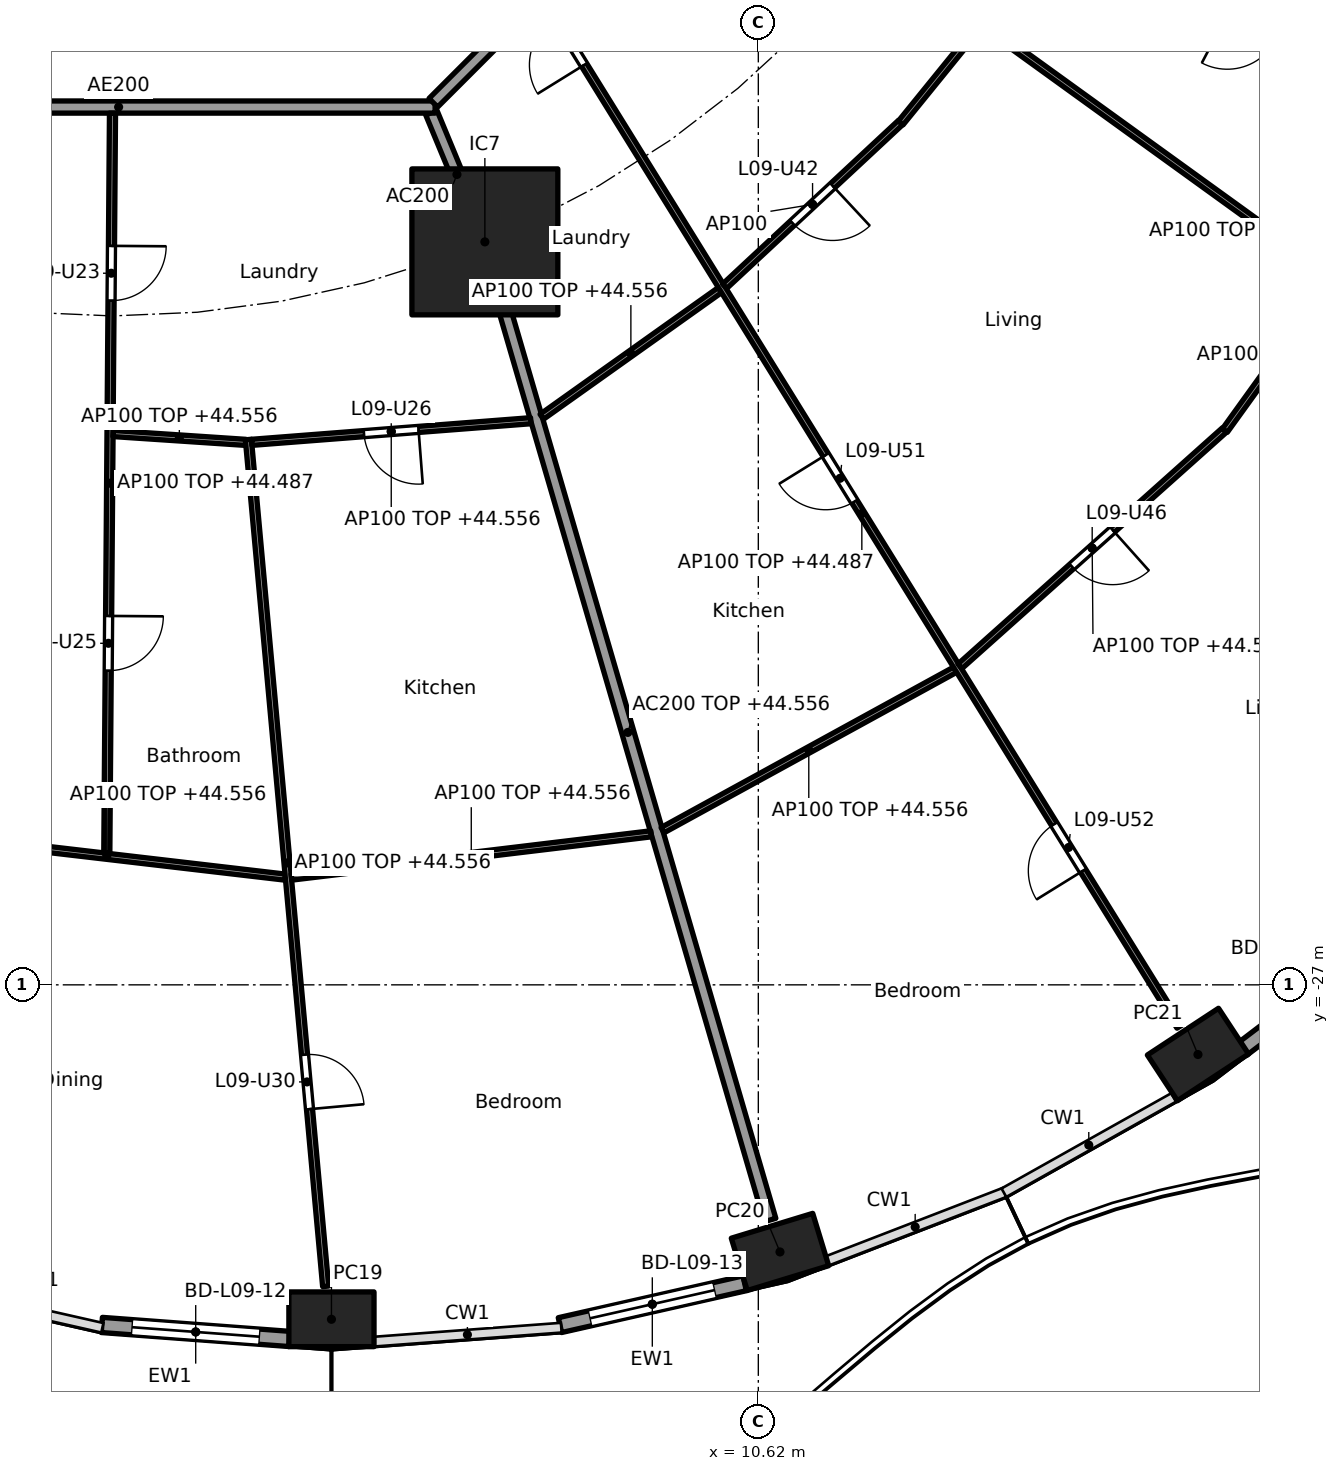
"""IFC4 building model, lengths in metres.
Left out: names, types, materials, properties, quantities, classifications, styles, units other than length and angle.
Written with IfcOpenShell. Run it as: python <this file> out.ifc"""

import sys

from ifc_helpers import new_model, si_unit, direction, frame, frame_2d, origin, origin_2d, place, context, subcontext, project, spatial, rectangle, hollow_rectangle, extrude, element, fill, save


model = new_model("IFC4")
c1 = context("Model", 3, precision=1e-05, world=origin(), true_north=direction((0.0, 1.0)))
c2 = subcontext(c1, "Body", "Model", "MODEL_VIEW")
j1 = project(units=[si_unit("LENGTHUNIT", "METRE"), si_unit("PLANEANGLEUNIT", "RADIAN")], contexts=[c1])
p1 = place(None, origin())
s1 = spatial("IfcSite", under=j1, at=p1, CompositionType="ELEMENT")
p2 = place(p1, origin())
s2 = spatial("IfcBuilding", under=s1, at=p2, CompositionType="ELEMENT")
p3 = place(p2, frame((0.0, 0.0, 41.8)))
s3 = spatial("IfcBuildingStorey", under=s2, at=p3, CompositionType="ELEMENT", Elevation=41.8)
for number, where, z_axis, x_axis in (
    (1, (3.6, -32.5, 0.0), (0.0, 0.0, 1.0), (1.0, 0.0, 0.0)),
    (2, (10.976, -31.393, 0.0), (0.0, 0.0, 1.0), (0.957, 0.292, 0.0)),
    (3, (17.85, -28.146, 0.0), (0.0, 0.0, 1.0), (0.836, 0.549, 0.0)),
):
    element("IfcColumn", number, at=place(p3, frame(where, z_axis=z_axis, x_axis=x_axis)), inside=s3, PredefinedType="COLUMN", context=c2, shape_type="SweptSolid", body=[
        extrude(hollow_rectangle(XDim=1.4, YDim=0.9, WallThickness=0.05, at=origin_2d()), origin(), (0.0, 0.0, 1.0), 3.7),
    ])
p4 = place(p3, frame((6.123, -14.782, 0.0), z_axis=(0.0, 0.0, 1.0), x_axis=(1.0, 0.0, 0.0)))
e4 = element("IfcColumn", 4, at=p4, inside=s3, PredefinedType="COLUMN", context=c2, shape_type="SweptSolid", body=[
    extrude(rectangle(XDim=2.4, YDim=2.4, at=origin_2d()), origin(), (0.0, 0.0, 1.0), 3.7),
])
p5 = place(p3, frame((2.911, -32.823, 0.0), z_axis=(0.0, 0.0, 1.0), x_axis=(-0.997230834878, 0.074368420505, 0.0)))
e5 = element("IfcWall", 5, at=p5, inside=s3, PredefinedType="SOLIDWALL", context=c2, shape_type="SweptSolid", body=[
    extrude(rectangle(XDim=3.096, YDim=0.25, at=frame_2d((1.548, 0.0))), origin(), (0.0, 0.0, 1.0), 3.44),
])
p6 = place(p5, frame((0.498, 0.0, 0.0)))
e6 = element("IfcOpeningElement", 6, at=p6, cuts=e5, PredefinedType="OPENING", context=c2, shape_type="SweptSolid", body=[
    extrude(rectangle(XDim=2.1, YDim=2.4, at=frame_2d((1.05, 1.2))), frame((0.0, 0.135, 0.0), z_axis=(0.0, -1.0, 0.0), x_axis=(1.0, 0.0, 0.0)), (0.0, 0.0, 1.0), 0.27),
])
p7 = place(p3, frame((10.396, -31.908, 0.0), z_axis=(0.0, 0.0, 1.0), x_axis=(-0.97533495413, -0.220729987208, 0.0)))
e7 = element("IfcWall", 7, at=p7, inside=s3, PredefinedType="SOLIDWALL", context=c2, shape_type="SweptSolid", body=[
    extrude(rectangle(XDim=3.115, YDim=0.25, at=frame_2d((1.557, 0.0))), origin(), (0.0, 0.0, 1.0), 3.44),
])
p8 = place(p7, frame((0.507, 0.0, 0.0)))
e8 = element("IfcOpeningElement", 8, at=p8, cuts=e7, PredefinedType="OPENING", context=c2, shape_type="SweptSolid", body=[
    extrude(rectangle(XDim=2.1, YDim=2.4, at=frame_2d((1.05, 1.2))), frame((0.0, 0.135, 0.0), z_axis=(0.0, -1.0, 0.0), x_axis=(1.0, 0.0, 0.0)), (0.0, 0.0, 1.0), 0.27),
])
p9 = place(p3, frame((21.178, -26.081, 0.0), z_axis=(0.0, 0.0, 1.0), x_axis=(-0.796022293214, -0.605267303517, 0.0)))
e9 = element("IfcWall", 9, at=p9, inside=s3, PredefinedType="SOLIDWALL", context=c2, shape_type="SweptSolid", body=[
    extrude(rectangle(XDim=3.262, YDim=0.25, at=frame_2d((1.631, 0.0))), origin(), (0.0, 0.0, 1.0), 3.44),
])
p10 = place(p9, frame((0.581, 0.0, 0.0)))
e10 = element("IfcOpeningElement", 10, at=p10, cuts=e9, PredefinedType="OPENING", context=c2, shape_type="SweptSolid", body=[
    extrude(rectangle(XDim=2.1, YDim=2.4, at=frame_2d((1.05, 1.2))), frame((0.0, 0.135, 0.0), z_axis=(0.0, -1.0, 0.0), x_axis=(1.0, 0.0, 0.0)), (0.0, 0.0, 1.0), 0.27),
])
p11 = place(p3, frame((5.243, -12.657, 0.0), z_axis=(0.0, 0.0, 1.0), x_axis=(0.382707856524, -0.923869415315, 0.0)))
e11 = element("IfcWall", 11, at=p11, inside=s3, PredefinedType="PARTITIONING", context=c2, shape_type="SweptSolid", body=[
    extrude(rectangle(XDim=2.2, YDim=0.2, at=frame_2d((1.1, 0.0))), origin(), (0.0, 0.0, 1.0), 3.44),
])
p12 = place(p3, frame((6.137, -14.83, 0.0), z_axis=(0.0, 0.0, 1.0), x_axis=(0.27985745069, -0.960041565399, 0.0)))
e12 = element("IfcWall", 12, at=p12, inside=s3, PredefinedType="PARTITIONING", context=c2, shape_type="SweptSolid", body=[
    extrude(rectangle(XDim=16.705, YDim=0.2, at=frame_2d((8.353, 0.0))), origin(), (0.0, 0.0, 1.0), 2.756),
])
p13 = place(p3, frame((-5.104, -12.565, 0.0), z_axis=(0.0, 0.0, 1.0), x_axis=(1.0, 0.0, 0.0)))
e13 = element("IfcWall", 13, at=p13, inside=s3, PredefinedType="PARTITIONING", context=c2, shape_type="SweptSolid", body=[
    extrude(rectangle(XDim=10.409, YDim=0.2, at=frame_2d((5.205, 0.0))), origin(), (0.0, 0.0, 1.0), 3.44),
])
p14 = place(p13, frame((2.87, 0.0, 0.0)))
e14 = element("IfcOpeningElement", 14, at=p14, cuts=e13, PredefinedType="OPENING", context=c2, shape_type="SweptSolid", body=[
    extrude(rectangle(XDim=1.0, YDim=2.1, at=frame_2d((0.5, 1.05))), frame((0.0, 0.11, 0.0), z_axis=(0.0, -1.0, 0.0), x_axis=(1.0, 0.0, 0.0)), (0.0, 0.0, 1.0), 0.22),
])
p15 = place(p3, frame((5.275, -12.494, 0.0), z_axis=(0.0, 0.0, 1.0), x_axis=(0.707106781187, 0.707106781187, 0.0)))
e15 = element("IfcWall", 15, at=p15, inside=s3, PredefinedType="PARTITIONING", context=c2, shape_type="SweptSolid", body=[
    extrude(rectangle(XDim=10.409, YDim=0.2, at=frame_2d((5.205, 0.0))), origin(), (0.0, 0.0, 1.0), 3.44),
])
p16 = place(p15, frame((8.508, 0.0, 0.0)))
e16 = element("IfcOpeningElement", 16, at=p16, cuts=e15, PredefinedType="OPENING", context=c2, shape_type="SweptSolid", body=[
    extrude(rectangle(XDim=1.0, YDim=2.1, at=frame_2d((0.5, 1.05))), frame((0.0, 0.11, 0.0), z_axis=(0.0, -1.0, 0.0), x_axis=(1.0, 0.0, 0.0)), (0.0, 0.0, 1.0), 0.22),
])
p17 = place(p3, frame((-3.031, -24.543, 0.0), z_axis=(0.0, 0.0, 1.0), x_axis=(0.993255612046, -0.115945198862, 0.0)))
e17 = element("IfcWall", 17, at=p17, inside=s3, PredefinedType="PARTITIONING", context=c2, shape_type="SweptSolid", body=[
    extrude(rectangle(XDim=5.913, YDim=0.1, at=frame_2d((2.956, 0.0))), origin(), (0.0, 0.0, 1.0), 2.756),
])
p18 = place(p3, frame((-0.001, -12.665, 0.0), z_axis=(0.0, 0.0, 1.0), x_axis=(-0.007702417287, -0.999970335944, 0.0)))
e18 = element("IfcWall", 18, at=p18, inside=s3, PredefinedType="PARTITIONING", context=c2, shape_type="SweptSolid", body=[
    extrude(rectangle(XDim=12.171, YDim=0.1, at=frame_2d((6.086, 0.0))), origin(), (0.0, 0.0, 1.0), 2.687),
])
p19 = place(p18, frame((2.183, 0.0, 0.0)))
e19 = element("IfcOpeningElement", 19, at=p19, cuts=e18, PredefinedType="OPENING", context=c2, shape_type="SweptSolid", body=[
    extrude(rectangle(XDim=0.9, YDim=2.1, at=frame_2d((0.45, 1.05))), frame((0.0, 0.06, 0.0), z_axis=(0.0, -1.0, 0.0), x_axis=(1.0, 0.0, 0.0)), (0.0, 0.0, 1.0), 0.12),
])
p20 = place(p18, frame((8.269, 0.0, 0.0)))
e20 = element("IfcOpeningElement", 20, at=p20, cuts=e18, PredefinedType="OPENING", context=c2, shape_type="SweptSolid", body=[
    extrude(rectangle(XDim=0.9, YDim=2.1, at=frame_2d((0.45, 1.05))), frame((0.0, 0.06, 0.0), z_axis=(0.0, -1.0, 0.0), x_axis=(1.0, 0.0, 0.0)), (0.0, 0.0, 1.0), 0.12),
])
p21 = place(p3, frame((0.009, -17.934, 0.0), z_axis=(0.0, 0.0, 1.0), x_axis=(0.997794542617, -0.066378089183, 0.0)))
e21 = element("IfcWall", 21, at=p21, inside=s3, PredefinedType="PARTITIONING", context=c2, shape_type="SweptSolid", body=[
    extrude(rectangle(XDim=2.185, YDim=0.1, at=frame_2d((1.092, 0.0))), origin(), (0.0, 0.0, 1.0), 2.756),
])
p22 = place(p3, frame((2.234, -18.032, 0.0), z_axis=(0.0, 0.0, 1.0), x_axis=(0.090891502968, -0.995860800859, 0.0)))
e22 = element("IfcWall", 22, at=p22, inside=s3, PredefinedType="PARTITIONING", context=c2, shape_type="SweptSolid", body=[
    extrude(rectangle(XDim=13.984, YDim=0.1, at=frame_2d((6.992, 0.0))), origin(), (0.0, 0.0, 1.0), 2.756),
])
p23 = place(p22, frame((10.158, 0.0, 0.0)))
e23 = element("IfcOpeningElement", 23, at=p23, cuts=e22, PredefinedType="OPENING", context=c2, shape_type="SweptSolid", body=[
    extrude(rectangle(XDim=0.9, YDim=2.1, at=frame_2d((0.45, 1.05))), frame((0.0, 0.06, 0.0), z_axis=(0.0, -1.0, 0.0), x_axis=(1.0, 0.0, 0.0)), (0.0, 0.0, 1.0), 0.12),
])
p24 = place(p3, frame((2.288, -18.078, 0.0), z_axis=(0.0, 0.0, 1.0), x_axis=(0.99701850123, 0.077162868047, 0.0)))
e24 = element("IfcWall", 24, at=p24, inside=s3, PredefinedType="PARTITIONING", context=c2, shape_type="SweptSolid", body=[
    extrude(rectangle(XDim=4.604, YDim=0.1, at=frame_2d((2.302, 0.0))), origin(), (0.0, 0.0, 1.0), 2.756),
])
p25 = place(p24, frame((1.852, 0.0, 0.0)))
e25 = element("IfcOpeningElement", 25, at=p25, cuts=e24, PredefinedType="OPENING", context=c2, shape_type="SweptSolid", body=[
    extrude(rectangle(XDim=0.9, YDim=2.1, at=frame_2d((0.45, 1.05))), frame((0.0, 0.06, 0.0), z_axis=(0.0, -1.0, 0.0), x_axis=(1.0, 0.0, 0.0)), (0.0, 0.0, 1.0), 0.12),
])
p26 = place(p3, frame((2.941, -25.229, 0.0), z_axis=(0.0, 0.0, 1.0), x_axis=(0.992834127896, 0.119500604542, 0.0)))
e26 = element("IfcWall", 26, at=p26, inside=s3, PredefinedType="PARTITIONING", context=c2, shape_type="SweptSolid", body=[
    extrude(rectangle(XDim=5.959, YDim=0.1, at=frame_2d((2.98, 0.0))), origin(), (0.0, 0.0, 1.0), 2.756),
])
p27 = place(p3, frame((7.06, -17.657, 0.0), z_axis=(0.0, 0.0, 1.0), x_axis=(0.81492039338, 0.57957290521, 0.0)))
e27 = element("IfcWall", 27, at=p27, inside=s3, PredefinedType="PARTITIONING", context=c2, shape_type="SweptSolid", body=[
    extrude(rectangle(XDim=3.594, YDim=0.1, at=frame_2d((1.797, 0.0))), origin(), (0.0, 0.0, 1.0), 2.756),
])
p28 = place(p3, frame((9.045, -24.456, 0.0), z_axis=(0.0, 0.0, 1.0), x_axis=(0.876809987787, 0.480837025734, 0.0)))
e28 = element("IfcWall", 28, at=p28, inside=s3, PredefinedType="PARTITIONING", context=c2, shape_type="SweptSolid", body=[
    extrude(rectangle(XDim=5.486, YDim=0.1, at=frame_2d((2.743, 0.0))), origin(), (0.0, 0.0, 1.0), 2.756),
])
p29 = place(p3, frame((7.097, -10.81, 0.0), z_axis=(0.0, 0.0, 1.0), x_axis=(0.526453266471, -0.850204068576, 0.0)))
e29 = element("IfcWall", 29, at=p29, inside=s3, PredefinedType="PARTITIONING", context=c2, shape_type="SweptSolid", body=[
    extrude(rectangle(XDim=19.85, YDim=0.1, at=frame_2d((9.925, 0.0))), origin(), (0.0, 0.0, 1.0), 2.687),
])
p30 = place(p29, frame((0.35, 0.0, 0.0)))
e30 = element("IfcOpeningElement", 30, at=p30, cuts=e29, PredefinedType="OPENING", context=c2, shape_type="SweptSolid", body=[
    extrude(rectangle(XDim=0.9, YDim=2.1, at=frame_2d((0.45, 1.05))), frame((0.0, 0.06, 0.0), z_axis=(0.0, -1.0, 0.0), x_axis=(1.0, 0.0, 0.0)), (0.0, 0.0, 1.0), 0.12),
])
p31 = place(p29, frame((8.795, 0.0, 0.0)))
e31 = element("IfcOpeningElement", 31, at=p31, cuts=e29, PredefinedType="OPENING", context=c2, shape_type="SweptSolid", body=[
    extrude(rectangle(XDim=0.9, YDim=2.1, at=frame_2d((0.45, 1.05))), frame((0.0, 0.06, 0.0), z_axis=(0.0, -1.0, 0.0), x_axis=(1.0, 0.0, 0.0)), (0.0, 0.0, 1.0), 0.12),
])
p32 = place(p29, frame((15.935, 0.0, 0.0)))
e32 = element("IfcOpeningElement", 32, at=p32, cuts=e29, PredefinedType="OPENING", context=c2, shape_type="SweptSolid", body=[
    extrude(rectangle(XDim=0.9, YDim=2.1, at=frame_2d((0.45, 1.05))), frame((0.0, 0.06, 0.0), z_axis=(0.0, -1.0, 0.0), x_axis=(1.0, 0.0, 0.0)), (0.0, 0.0, 1.0), 0.12),
])
p33 = place(p3, frame((10.066, -15.511, 0.0), z_axis=(0.0, 0.0, 1.0), x_axis=(0.732022571638, 0.681280378855, 0.0)))
e33 = element("IfcWall", 33, at=p33, inside=s3, PredefinedType="PARTITIONING", context=c2, shape_type="SweptSolid", body=[
    extrude(rectangle(XDim=3.95, YDim=0.1, at=frame_2d((1.975, 0.0))), origin(), (0.0, 0.0, 1.0), 3.44),
])
p34 = place(p33, frame((1.525, 0.0, 0.0)))
e34 = element("IfcOpeningElement", 34, at=p34, cuts=e33, PredefinedType="OPENING", context=c2, shape_type="SweptSolid", body=[
    extrude(rectangle(XDim=0.9, YDim=2.1, at=frame_2d((0.45, 1.05))), frame((0.0, 0.06, 0.0), z_axis=(0.0, -1.0, 0.0), x_axis=(1.0, 0.0, 0.0)), (0.0, 0.0, 1.0), 0.12),
])
p35 = place(p3, frame((13.936, -21.761, 0.0), z_axis=(0.0, 0.0, 1.0), x_axis=(0.745806142791, 0.666163041136, 0.0)))
e35 = element("IfcWall", 35, at=p35, inside=s3, PredefinedType="PARTITIONING", context=c2, shape_type="SweptSolid", body=[
    extrude(rectangle(XDim=5.831, YDim=0.1, at=frame_2d((2.915, 0.0))), origin(), (0.0, 0.0, 1.0), 2.756),
])
p36 = place(p35, frame((2.465, 0.0, 0.0)))
e36 = element("IfcOpeningElement", 36, at=p36, cuts=e35, PredefinedType="OPENING", context=c2, shape_type="SweptSolid", body=[
    extrude(rectangle(XDim=0.9, YDim=2.1, at=frame_2d((0.45, 1.05))), frame((0.0, 0.06, 0.0), z_axis=(0.0, -1.0, 0.0), x_axis=(1.0, 0.0, 0.0)), (0.0, 0.0, 1.0), 0.12),
])
p37 = place(p3, frame((12.963, -12.825, 0.0), z_axis=(0.0, 0.0, 1.0), x_axis=(0.63012473344, 0.776493928056, 0.0)))
e37 = element("IfcWall", 37, at=p37, inside=s3, PredefinedType="PARTITIONING", context=c2, shape_type="SweptSolid", body=[
    extrude(rectangle(XDim=4.106, YDim=0.1, at=frame_2d((2.053, 0.0))), origin(), (0.0, 0.0, 1.0), 2.756),
])
p38 = place(p3, frame((18.293, -17.884, 0.0), z_axis=(0.0, 0.0, 1.0), x_axis=(0.584558392935, 0.811351640936, 0.0)))
e38 = element("IfcWall", 38, at=p38, inside=s3, PredefinedType="PARTITIONING", context=c2, shape_type="SweptSolid", body=[
    extrude(rectangle(XDim=6.084, YDim=0.1, at=frame_2d((3.042, 0.0))), origin(), (0.0, 0.0, 1.0), 2.756),
])
p39 = place(p3, frame((14.329, -11.221, 0.0), z_axis=(0.0, 0.0, 1.0), x_axis=(0.810671130917, -0.58550176558, 0.0)))
e39 = element("IfcWall", 39, at=p39, inside=s3, PredefinedType="PARTITIONING", context=c2, shape_type="SweptSolid", body=[
    extrude(rectangle(XDim=15.106, YDim=0.1, at=frame_2d((7.553, 0.0))), origin(), (0.0, 0.0, 1.0), 2.837),
])
p40 = place(p39, frame((10.659, 0.0, 0.0)))
e40 = element("IfcOpeningElement", 40, at=p40, cuts=e39, PredefinedType="OPENING", context=c2, shape_type="SweptSolid", body=[
    extrude(rectangle(XDim=0.9, YDim=2.1, at=frame_2d((0.45, 1.05))), frame((0.0, 0.06, 0.0), z_axis=(0.0, -1.0, 0.0), x_axis=(1.0, 0.0, 0.0)), (0.0, 0.0, 1.0), 0.12),
])
p41 = place(p3, frame((10.813, -7.091, 0.0), z_axis=(0.0, 0.0, 1.0), x_axis=(0.885182649479, -0.465243674928, 0.0)))
e41 = element("IfcWall", 41, at=p41, inside=s3, PredefinedType="PARTITIONING", context=c2, shape_type="SweptSolid", body=[
    extrude(rectangle(XDim=12.551, YDim=0.1, at=frame_2d((6.275, 0.0))), origin(), (0.0, 0.0, 1.0), 2.687),
])
p42 = place(p41, frame((0.539, 0.0, 0.0)))
e42 = element("IfcOpeningElement", 42, at=p42, cuts=e41, PredefinedType="OPENING", context=c2, shape_type="SweptSolid", body=[
    extrude(rectangle(XDim=0.9, YDim=2.1, at=frame_2d((0.45, 1.05))), frame((0.0, 0.06, 0.0), z_axis=(0.0, -1.0, 0.0), x_axis=(1.0, 0.0, 0.0)), (0.0, 0.0, 1.0), 0.12),
])
p43 = place(p41, frame((8.494, 0.0, 0.0)))
e43 = element("IfcOpeningElement", 43, at=p43, cuts=e41, PredefinedType="OPENING", context=c2, shape_type="SweptSolid", body=[
    extrude(rectangle(XDim=0.9, YDim=2.1, at=frame_2d((0.45, 1.05))), frame((0.0, 0.06, 0.0), z_axis=(0.0, -1.0, 0.0), x_axis=(1.0, 0.0, 0.0)), (0.0, 0.0, 1.0), 0.12),
])
p44 = place(p6, origin())
e44 = element("IfcDoor", 44, at=p44, inside=s3, OperationType="SLIDING_TO_LEFT", PredefinedType="DOOR", context=c2, shape_type="SweptSolid", body=[
    extrude(rectangle(XDim=2.1, YDim=2.4, at=frame_2d((1.05, 1.2))), frame((0.0, 0.025, 0.0), z_axis=(0.0, -1.0, 0.0), x_axis=(1.0, 0.0, 0.0)), (0.0, 0.0, 1.0), 0.05),
])
fill(e6, e44)
p45 = place(p8, origin())
e45 = element("IfcDoor", 45, at=p45, inside=s3, OperationType="SLIDING_TO_LEFT", PredefinedType="DOOR", context=c2, shape_type="SweptSolid", body=[
    extrude(rectangle(XDim=2.1, YDim=2.4, at=frame_2d((1.05, 1.2))), frame((0.0, 0.025, 0.0), z_axis=(0.0, -1.0, 0.0), x_axis=(1.0, 0.0, 0.0)), (0.0, 0.0, 1.0), 0.05),
])
fill(e8, e45)
p46 = place(p19, origin())
e46 = element("IfcDoor", 46, at=p46, inside=s3, OperationType="SINGLE_SWING_LEFT", PredefinedType="DOOR", context=c2, shape_type="SweptSolid", body=[
    extrude(rectangle(XDim=0.9, YDim=2.1, at=frame_2d((0.45, 1.05))), frame((0.0, 0.025, 0.0), z_axis=(0.0, -1.0, 0.0), x_axis=(1.0, 0.0, 0.0)), (0.0, 0.0, 1.0), 0.05),
])
fill(e19, e46)
p47 = place(p20, origin())
e47 = element("IfcDoor", 47, at=p47, inside=s3, OperationType="SINGLE_SWING_LEFT", PredefinedType="DOOR", context=c2, shape_type="SweptSolid", body=[
    extrude(rectangle(XDim=0.9, YDim=2.1, at=frame_2d((0.45, 1.05))), frame((0.0, 0.025, 0.0), z_axis=(0.0, -1.0, 0.0), x_axis=(1.0, 0.0, 0.0)), (0.0, 0.0, 1.0), 0.05),
])
fill(e20, e47)
p48 = place(p25, frame((0.9, 0.0, 0.0), x_axis=(-1.0, 0.0, 0.0)))
e48 = element("IfcDoor", 48, at=p48, inside=s3, OperationType="SINGLE_SWING_LEFT", PredefinedType="DOOR", context=c2, shape_type="SweptSolid", body=[
    extrude(rectangle(XDim=0.9, YDim=2.1, at=frame_2d((0.45, 1.05))), frame((0.0, 0.025, 0.0), z_axis=(0.0, -1.0, 0.0), x_axis=(1.0, 0.0, 0.0)), (0.0, 0.0, 1.0), 0.05),
])
fill(e25, e48)
p49 = place(p23, origin())
e49 = element("IfcDoor", 49, at=p49, inside=s3, OperationType="SINGLE_SWING_RIGHT", PredefinedType="DOOR", context=c2, shape_type="SweptSolid", body=[
    extrude(rectangle(XDim=0.9, YDim=2.1, at=frame_2d((0.45, 1.05))), frame((0.0, 0.025, 0.0), z_axis=(0.0, -1.0, 0.0), x_axis=(1.0, 0.0, 0.0)), (0.0, 0.0, 1.0), 0.05),
])
fill(e23, e49)
p50 = place(p34, frame((0.9, 0.0, 0.0), x_axis=(-1.0, 0.0, 0.0)))
e50 = element("IfcDoor", 50, at=p50, inside=s3, OperationType="SINGLE_SWING_LEFT", PredefinedType="DOOR", context=c2, shape_type="SweptSolid", body=[
    extrude(rectangle(XDim=0.9, YDim=2.1, at=frame_2d((0.45, 1.05))), frame((0.0, 0.025, 0.0), z_axis=(0.0, -1.0, 0.0), x_axis=(1.0, 0.0, 0.0)), (0.0, 0.0, 1.0), 0.05),
])
fill(e34, e50)
p51 = place(p36, frame((0.9, 0.0, 0.0), x_axis=(-1.0, 0.0, 0.0)))
e51 = element("IfcDoor", 51, at=p51, inside=s3, OperationType="SINGLE_SWING_LEFT", PredefinedType="DOOR", context=c2, shape_type="SweptSolid", body=[
    extrude(rectangle(XDim=0.9, YDim=2.1, at=frame_2d((0.45, 1.05))), frame((0.0, 0.025, 0.0), z_axis=(0.0, -1.0, 0.0), x_axis=(1.0, 0.0, 0.0)), (0.0, 0.0, 1.0), 0.05),
])
fill(e36, e51)
p52 = place(p30, frame((0.9, 0.0, 0.0), x_axis=(-1.0, 0.0, 0.0)))
e52 = element("IfcDoor", 52, at=p52, inside=s3, OperationType="SINGLE_SWING_LEFT", PredefinedType="DOOR", context=c2, shape_type="SweptSolid", body=[
    extrude(rectangle(XDim=0.9, YDim=2.1, at=frame_2d((0.45, 1.05))), frame((0.0, 0.025, 0.0), z_axis=(0.0, -1.0, 0.0), x_axis=(1.0, 0.0, 0.0)), (0.0, 0.0, 1.0), 0.05),
])
fill(e30, e52)
p53 = place(p31, frame((0.9, 0.0, 0.0), x_axis=(-1.0, 0.0, 0.0)))
e53 = element("IfcDoor", 53, at=p53, inside=s3, OperationType="SINGLE_SWING_RIGHT", PredefinedType="DOOR", context=c2, shape_type="SweptSolid", body=[
    extrude(rectangle(XDim=0.9, YDim=2.1, at=frame_2d((0.45, 1.05))), frame((0.0, 0.025, 0.0), z_axis=(0.0, -1.0, 0.0), x_axis=(1.0, 0.0, 0.0)), (0.0, 0.0, 1.0), 0.05),
])
fill(e31, e53)
p54 = place(p32, frame((0.9, 0.0, 0.0), x_axis=(-1.0, 0.0, 0.0)))
e54 = element("IfcDoor", 54, at=p54, inside=s3, OperationType="SINGLE_SWING_LEFT", PredefinedType="DOOR", context=c2, shape_type="SweptSolid", body=[
    extrude(rectangle(XDim=0.9, YDim=2.1, at=frame_2d((0.45, 1.05))), frame((0.0, 0.025, 0.0), z_axis=(0.0, -1.0, 0.0), x_axis=(1.0, 0.0, 0.0)), (0.0, 0.0, 1.0), 0.05),
])
fill(e32, e54)
save(model, sys.argv[1])
